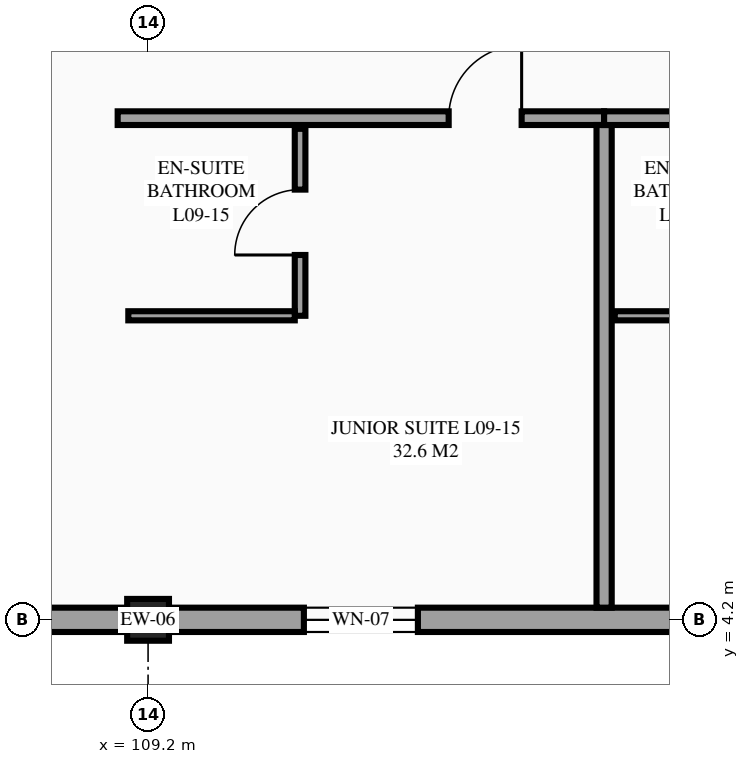
"""IFC4 building model, lengths in metres.
Left out: names, types, materials, properties, quantities, classifications, styles, units other than length and angle.
Written with IfcOpenShell. Run it as: python <this file> out.ifc"""

import sys

from ifc_helpers import new_model, si_unit, direction, frame, frame_2d, origin, origin_2d, place, context, subcontext, project, spatial, rectangle, extrude, element, fill, save


model = new_model("IFC4")
c1 = context("Model", 3, precision=1e-05, world=origin(), true_north=direction((0.0, 1.0)))
c2 = subcontext(c1, "Body", "Model", "MODEL_VIEW")
j1 = project(units=[si_unit("LENGTHUNIT", "METRE"), si_unit("PLANEANGLEUNIT", "RADIAN")], contexts=[c1])
p1 = place(None, origin())
s1 = spatial("IfcSite", under=j1, at=p1, CompositionType="ELEMENT")
p2 = place(p1, origin())
s2 = spatial("IfcBuilding", under=s1, at=p2, CompositionType="ELEMENT")
p3 = place(p2, frame((0.0, 0.0, 36.3)))
s3 = spatial("IfcBuildingStorey", under=s2, at=p3, CompositionType="ELEMENT", Elevation=36.3)
p4 = place(p3, frame((109.2, 4.2, 0.0), z_axis=(0.0, 0.0, 1.0), x_axis=(1.0, 0.0, 0.0)))
e1 = element("IfcColumn", 1, at=p4, inside=s3, PredefinedType="COLUMN", context=c2, shape_type="SweptSolid", body=[
    extrude(rectangle(XDim=0.55, YDim=0.55, at=origin_2d()), origin(), (0.0, 0.0, 1.0), 3.6),
])
p5 = place(p3, frame((100.8, 4.2, 0.0), z_axis=(0.0, 0.0, 1.0), x_axis=(1.0, 0.0, 0.0)))
e2 = element("IfcWall", 2, at=p5, inside=s3, PredefinedType="STANDARD", context=c2, shape_type="SweptSolid", body=[
    extrude(rectangle(XDim=16.8, YDim=0.32, at=frame_2d((8.4, 0.0))), origin(), (0.0, 0.0, 1.0), 2.53),
])
p6 = place(p5, frame((10.45, 0.0, 0.85)))
e3 = element("IfcOpeningElement", 3, at=p6, cuts=e2, PredefinedType="OPENING", context=c2, shape_type="SweptSolid", body=[
    extrude(rectangle(XDim=1.5, YDim=1.5, at=frame_2d((0.75, 0.75))), frame((0.0, 0.17, 0.0), z_axis=(0.0, -1.0, 0.0), x_axis=(1.0, 0.0, 0.0)), (0.0, 0.0, 1.0), 0.34),
])
p7 = place(p3, frame((108.8, 10.8, 0.0), z_axis=(0.0, 0.0, 1.0), x_axis=(1.0, 0.0, 0.0)))
e4 = element("IfcWall", 4, at=p7, inside=s3, PredefinedType="PARTITIONING", context=c2, shape_type="SweptSolid", body=[
    extrude(rectangle(XDim=6.4, YDim=0.18, at=frame_2d((3.2, 0.0))), origin(), (0.0, 0.0, 1.0), 3.375),
])
p8 = place(p7, frame((4.355, 0.0, 0.0)))
e5 = element("IfcOpeningElement", 5, at=p8, cuts=e4, PredefinedType="OPENING", context=c2, shape_type="SweptSolid", body=[
    extrude(rectangle(XDim=0.96, YDim=2.15, at=frame_2d((0.48, 1.075))), frame((0.0, 0.1, 0.0), z_axis=(0.0, -1.0, 0.0), x_axis=(1.0, 0.0, 0.0)), (0.0, 0.0, 1.0), 0.2),
])
p9 = place(p3, frame((115.2, 4.36, 0.0), z_axis=(0.0, 0.0, 1.0), x_axis=(0.0, 1.0, 0.0)))
e6 = element("IfcWall", 6, at=p9, inside=s3, PredefinedType="PARTITIONING", context=c2, shape_type="SweptSolid", body=[
    extrude(rectangle(XDim=6.35, YDim=0.2, at=frame_2d((3.175, 0.0))), origin(), (0.0, 0.0, 1.0), 3.375),
])
p10 = place(p3, frame((111.2, 8.2, 0.0), z_axis=(0.0, 0.0, 1.0), x_axis=(0.0, 1.0, 0.0)))
e7 = element("IfcWall", 7, at=p10, inside=s3, PredefinedType="PARTITIONING", context=c2, shape_type="SweptSolid", body=[
    extrude(rectangle(XDim=2.46, YDim=0.14, at=frame_2d((1.23, 0.0))), origin(), (0.0, 0.0, 1.0), 3.375),
])
p11 = place(p10, frame((0.8, 0.0, 0.0)))
e8 = element("IfcOpeningElement", 8, at=p11, cuts=e7, PredefinedType="OPENING", context=c2, shape_type="SweptSolid", body=[
    extrude(rectangle(XDim=0.86, YDim=2.1, at=frame_2d((0.43, 1.05))), frame((0.0, 0.08, 0.0), z_axis=(0.0, -1.0, 0.0), x_axis=(1.0, 0.0, 0.0)), (0.0, 0.0, 1.0), 0.16),
])
p12 = place(p3, frame((108.94, 8.2, 0.0), z_axis=(0.0, 0.0, 1.0), x_axis=(1.0, 0.0, 0.0)))
e9 = element("IfcWall", 9, at=p12, inside=s3, PredefinedType="PARTITIONING", context=c2, shape_type="SweptSolid", body=[
    extrude(rectangle(XDim=2.19, YDim=0.12, at=frame_2d((1.095, 0.0))), origin(), (0.0, 0.0, 1.0), 3.375),
])
p13 = place(p3, frame((115.2, 10.8, 0.0), z_axis=(0.0, 0.0, 1.0), x_axis=(1.0, 0.0, 0.0)))
e10 = element("IfcWall", 10, at=p13, inside=s3, PredefinedType="PARTITIONING", context=c2, shape_type="SweptSolid", body=[
    extrude(rectangle(XDim=6.4, YDim=0.18, at=frame_2d((3.2, 0.0))), origin(), (0.0, 0.0, 1.0), 3.375),
])
p14 = place(p13, frame((4.355, 0.0, 0.0)))
e11 = element("IfcOpeningElement", 11, at=p14, cuts=e10, PredefinedType="OPENING", context=c2, shape_type="SweptSolid", body=[
    extrude(rectangle(XDim=0.96, YDim=2.15, at=frame_2d((0.48, 1.075))), frame((0.0, 0.1, 0.0), z_axis=(0.0, -1.0, 0.0), x_axis=(1.0, 0.0, 0.0)), (0.0, 0.0, 1.0), 0.2),
])
p15 = place(p3, frame((115.34, 8.2, 0.0), z_axis=(0.0, 0.0, 1.0), x_axis=(1.0, 0.0, 0.0)))
e12 = element("IfcWall", 12, at=p15, inside=s3, PredefinedType="PARTITIONING", context=c2, shape_type="SweptSolid", body=[
    extrude(rectangle(XDim=2.19, YDim=0.12, at=frame_2d((1.095, 0.0))), origin(), (0.0, 0.0, 1.0), 3.375),
])
p16 = place(p6, origin())
e13 = element("IfcWindow", 13, at=p16, inside=s3, PartitioningType="SINGLE_PANEL", PredefinedType="WINDOW", context=c2, shape_type="SweptSolid", body=[
    extrude(rectangle(XDim=1.5, YDim=1.5, at=frame_2d((0.75, 0.75))), frame((0.0, 0.03, 0.0), z_axis=(0.0, -1.0, 0.0), x_axis=(1.0, 0.0, 0.0)), (0.0, 0.0, 1.0), 0.06),
])
fill(e3, e13)
p17 = place(p8, origin())
e14 = element("IfcDoor", 14, at=p17, inside=s3, OperationType="SINGLE_SWING_RIGHT", PredefinedType="DOOR", context=c2, shape_type="SweptSolid", body=[
    extrude(rectangle(XDim=0.96, YDim=2.15, at=frame_2d((0.48, 1.075))), frame((0.0, 0.025, 0.0), z_axis=(0.0, -1.0, 0.0), x_axis=(1.0, 0.0, 0.0)), (0.0, 0.0, 1.0), 0.05),
])
fill(e5, e14)
p18 = place(p11, origin())
e15 = element("IfcDoor", 15, at=p18, inside=s3, OperationType="SINGLE_SWING_LEFT", PredefinedType="DOOR", context=c2, shape_type="SweptSolid", body=[
    extrude(rectangle(XDim=0.86, YDim=2.1, at=frame_2d((0.43, 1.05))), frame((0.0, 0.025, 0.0), z_axis=(0.0, -1.0, 0.0), x_axis=(1.0, 0.0, 0.0)), (0.0, 0.0, 1.0), 0.05),
])
fill(e8, e15)
save(model, sys.argv[1])
